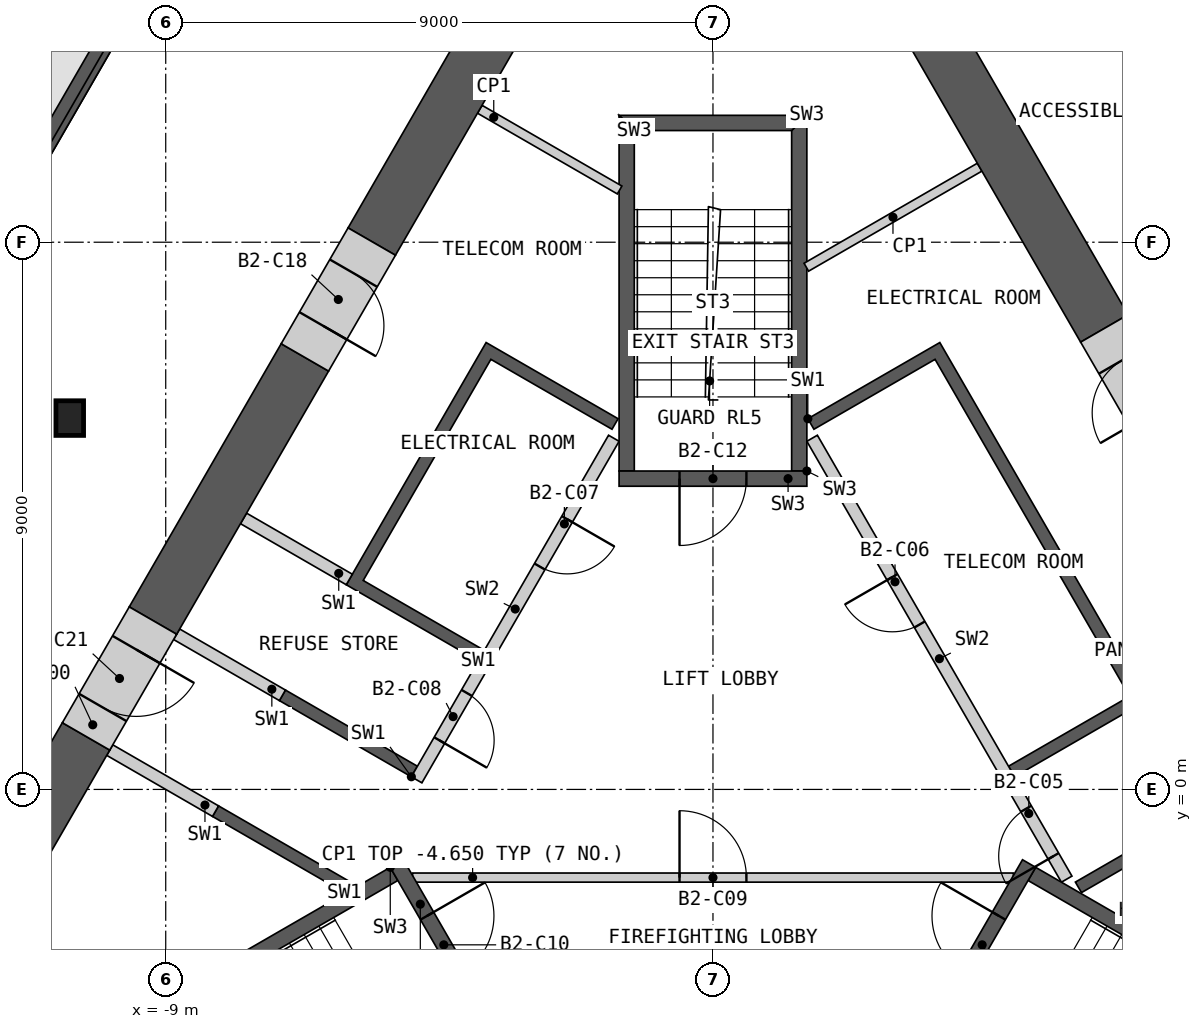
"""IFC4 building model, lengths in metres.
Left out: names, types, materials, properties, quantities, classifications, styles, units other than length and angle.
Written with IfcOpenShell. Run it as: python <this file> out.ifc"""

import sys

from ifc_helpers import new_model, si_unit, direction, frame, frame_2d, origin, origin_2d, place, context, subcontext, project, spatial, polyline, rectangle, i_section, outline, extrude, element, fill, save


model = new_model("IFC4")
c1 = context("Model", 3, precision=1e-05, world=origin(), true_north=direction((0.0, 1.0)))
c2 = subcontext(c1, "Body", "Model", "MODEL_VIEW")
j1 = project(units=[si_unit("LENGTHUNIT", "METRE"), si_unit("PLANEANGLEUNIT", "RADIAN")], contexts=[c1])
p1 = place(None, origin())
s1 = spatial("IfcSite", under=j1, at=p1, CompositionType="ELEMENT")
p2 = place(p1, origin())
s2 = spatial("IfcBuilding", under=s1, at=p2, CompositionType="ELEMENT")
p3 = place(p2, frame((0.0, 0.0, -8.4)))
s3 = spatial("IfcBuildingStorey", under=s2, at=p3, CompositionType="ELEMENT", Elevation=-8.4)
for number, where, z_axis, x_axis in (
    (1, (31.74, -10.542, 0.0), (0.0, 0.0, 1.0), (-0.5, 0.866, 0.0)),
    (2, (-6.74, 32.759, 0.0), (0.0, 0.0, 1.0), (-0.5, -0.866, 0.0)),
):
    element("IfcWall", number, at=place(p3, frame(where, z_axis=z_axis, x_axis=x_axis)), inside=s3, PredefinedType="SOLIDWALL", context=c2, shape_type="SweptSolid", body=[
        extrude(rectangle(XDim=50.0, YDim=0.6, at=frame_2d((25.0, 0.0))), origin(), (0.0, 0.0, 1.0), 3.75),
    ])
p4 = place(p3, frame((-10.578, 6.107, 0.0), z_axis=(0.0, 0.0, 1.0), x_axis=(1.0, 0.0, 0.0)))
e3 = element("IfcColumn", 3, at=p4, inside=s3, PredefinedType="COLUMN", context=c2, shape_type="SweptSolid", body=[
    extrude(i_section(OverallWidth=0.454, OverallDepth=0.57, WebThickness=0.078, FlangeThickness=0.125, at=origin_2d()), origin(), (0.0, 0.0, 1.0), 4.2),
])
p5 = place(p3, origin())
e4 = element("IfcWall", 4, at=p5, inside=s3, PredefinedType="SHEAR", context=c2, shape_type="SweptSolid", body=[
    extrude(outline(polyline([(1.561, 6.097), (3.731, 7.35), (7.131, 1.461), (4.96, 0.208), (4.861, 0.381), (6.852, 1.531), (3.652, 7.074), (1.66, 5.924), (1.561, 6.097)])), origin(), (0.0, 0.0, 1.0), 3.75),
])
p6 = place(p3, origin())
e5 = element("IfcWall", 5, at=p6, inside=s3, PredefinedType="SHEAR", context=c2, shape_type="SweptSolid", body=[
    extrude(outline(polyline([(8.231, -0.444), (6.061, -1.697), (5.96, -1.524), (8.131, -0.271), (8.231, -0.444)])), origin(), (0.0, 0.0, 1.0), 3.75),
])
p7 = place(p3, frame((5.817, -1.476, 0.0), z_axis=(0.0, 0.0, 1.0), x_axis=(-0.500002616675, 0.866023893041, 0.0)))
e6 = element("IfcWall", 6, at=p7, inside=s3, PredefinedType="SOLIDWALL", context=c2, shape_type="SweptSolid", body=[
    extrude(rectangle(XDim=8.373, YDim=0.2, at=frame_2d((4.187, 0.0))), origin(), (0.0, 0.0, 1.0), 3.75),
])
p8 = place(p7, frame((0.437, 0.0, 0.0)))
e7 = element("IfcOpeningElement", 7, at=p8, cuts=e6, PredefinedType="OPENING", context=c2, shape_type="SweptSolid", body=[
    extrude(rectangle(XDim=0.9, YDim=2.1, at=frame_2d((0.45, 1.05))), frame((0.0, 0.11, 0.0), z_axis=(0.0, -1.0, 0.0), x_axis=(1.0, 0.0, 0.0)), (0.0, 0.0, 1.0), 0.22),
])
p9 = place(p7, frame((4.837, 0.0, 0.0)))
e8 = element("IfcOpeningElement", 8, at=p9, cuts=e6, PredefinedType="OPENING", context=c2, shape_type="SweptSolid", body=[
    extrude(rectangle(XDim=0.9, YDim=2.1, at=frame_2d((0.45, 1.05))), frame((0.0, 0.11, 0.0), z_axis=(0.0, -1.0, 0.0), x_axis=(1.0, 0.0, 0.0)), (0.0, 0.0, 1.0), 0.22),
])
p10 = place(p3, origin())
e9 = element("IfcWall", 9, at=p10, inside=s3, PredefinedType="SHEAR", context=c2, shape_type="SweptSolid", body=[
    extrude(outline(polyline([(-6.061, -1.697), (-8.231, -0.444), (-8.131, -0.271), (-5.96, -1.524), (-6.061, -1.697)])), origin(), (0.0, 0.0, 1.0), 3.75),
])
p11 = place(p3, origin())
e10 = element("IfcWall", 10, at=p11, inside=s3, PredefinedType="SHEAR", context=c2, shape_type="SweptSolid", body=[
    extrude(outline(polyline([(-4.96, 0.208), (-7.131, 1.461), (-7.031, 1.634), (-4.861, 0.381), (-4.96, 0.208)])), origin(), (0.0, 0.0, 1.0), 3.75),
])
p12 = place(p3, origin())
e11 = element("IfcWall", 11, at=p12, inside=s3, PredefinedType="SHEAR", context=c2, shape_type="SweptSolid", body=[
    extrude(outline(polyline([(-3.861, 2.113), (-6.031, 3.366), (-3.731, 7.35), (-1.561, 6.097), (-1.66, 5.924), (-3.652, 7.074), (-5.752, 3.437), (-3.76, 2.287), (-3.861, 2.113)])), origin(), (0.0, 0.0, 1.0), 3.75),
])
p13 = place(p3, frame((-1.631, 5.776, 0.0), z_axis=(0.0, 0.0, 1.0), x_axis=(-0.499992876559, -0.866029516466, 0.0)))
e12 = element("IfcWall", 12, at=p13, inside=s3, PredefinedType="SOLIDWALL", context=c2, shape_type="SweptSolid", body=[
    extrude(rectangle(XDim=6.486, YDim=0.2, at=frame_2d((3.243, 0.0))), origin(), (0.0, 0.0, 1.0), 3.75),
])
p14 = place(p13, frame((1.537, 0.0, 0.0)))
e13 = element("IfcOpeningElement", 13, at=p14, cuts=e12, PredefinedType="OPENING", context=c2, shape_type="SweptSolid", body=[
    extrude(rectangle(XDim=0.9, YDim=2.1, at=frame_2d((0.45, 1.05))), frame((0.0, 0.11, 0.0), z_axis=(0.0, -1.0, 0.0), x_axis=(1.0, 0.0, 0.0)), (0.0, 0.0, 1.0), 0.22),
])
p15 = place(p13, frame((4.837, 0.0, 0.0)))
e14 = element("IfcOpeningElement", 14, at=p15, cuts=e12, PredefinedType="OPENING", context=c2, shape_type="SweptSolid", body=[
    extrude(rectangle(XDim=0.9, YDim=2.1, at=frame_2d((0.45, 1.05))), frame((0.0, 0.11, 0.0), z_axis=(0.0, -1.0, 0.0), x_axis=(1.0, 0.0, 0.0)), (0.0, 0.0, 1.0), 0.22),
])
p16 = place(p3, frame((-5.981, 3.453, 0.0), z_axis=(0.0, 0.0, 1.0), x_axis=(-0.866013584312, 0.500020471368, 0.0)))
e15 = element("IfcWall", 15, at=p16, inside=s3, PredefinedType="SHEAR", context=c2, shape_type="SweptSolid", body=[
    extrude(rectangle(XDim=2.009, YDim=0.2, at=frame_2d((1.005, 0.0))), origin(), (0.0, 0.0, 1.0), 3.75),
])
p17 = place(p3, frame((-7.081, 1.548, 0.0), z_axis=(0.0, 0.0, 1.0), x_axis=(-0.865983199114, 0.50007309351, 0.0)))
e16 = element("IfcWall", 16, at=p17, inside=s3, PredefinedType="SHEAR", context=c2, shape_type="SweptSolid", body=[
    extrude(rectangle(XDim=2.009, YDim=0.2, at=frame_2d((1.004, 0.0))), origin(), (0.0, 0.0, 1.0), 3.75),
])
p18 = place(p3, frame((-8.181, -0.357, 0.0), z_axis=(0.0, 0.0, 1.0), x_axis=(-0.866035824272, 0.499981950752, 0.0)))
e17 = element("IfcWall", 17, at=p18, inside=s3, PredefinedType="SHEAR", context=c2, shape_type="SweptSolid", body=[
    extrude(rectangle(XDim=2.009, YDim=0.2, at=frame_2d((1.004, 0.0))), origin(), (0.0, 0.0, 1.0), 3.75),
])
p19 = place(p3, frame((-4.941, -1.45, 0.0), z_axis=(0.0, 0.0, 1.0), x_axis=(1.0, 0.0, 0.0)))
e18 = element("IfcWall", 18, at=p19, inside=s3, PredefinedType="PARTITIONING", context=c2, shape_type="SweptSolid", body=[
    extrude(rectangle(XDim=9.882, YDim=0.15, at=frame_2d((4.941, 0.0))), origin(), (0.0, 0.0, 1.0), 3.75),
])
p20 = place(p19, frame((4.391, 0.0, 0.0)))
e19 = element("IfcOpeningElement", 19, at=p20, cuts=e18, PredefinedType="OPENING", context=c2, shape_type="SweptSolid", body=[
    extrude(rectangle(XDim=1.1, YDim=2.1, at=frame_2d((0.55, 1.05))), frame((0.0, 0.085, 0.0), z_axis=(0.0, -1.0, 0.0), x_axis=(1.0, 0.0, 0.0)), (0.0, 0.0, 1.0), 0.17),
])
p21 = place(p3, origin())
e20 = element("IfcWall", 20, at=p21, inside=s3, PredefinedType="SHEAR", context=c2, shape_type="SweptSolid", body=[
    extrude(outline(polyline([(-5.307, -1.281), (-10.374, -4.206), (-10.032, -4.298), (-5.182, -1.498), (-5.307, -1.281)])), origin(), (0.0, 0.0, 1.0), 3.75),
])
p22 = place(p3, frame((-5.199, -1.219, 0.0), z_axis=(0.0, 0.0, 1.0), x_axis=(0.499982516597, -0.866035497597, 0.0)))
e21 = element("IfcWall", 21, at=p22, inside=s3, PredefinedType="SHEAR", context=c2, shape_type="SweptSolid", body=[
    extrude(rectangle(XDim=3.088, YDim=0.25, at=frame_2d((1.544, 0.0))), origin(), (0.0, 0.0, 1.0), 3.75),
])
p23 = place(p22, frame((0.994, 0.0, 0.0)))
e22 = element("IfcOpeningElement", 22, at=p23, cuts=e21, PredefinedType="OPENING", context=c2, shape_type="SweptSolid", body=[
    extrude(rectangle(XDim=1.1, YDim=2.1, at=frame_2d((0.55, 1.05))), frame((0.0, 0.135, 0.0), z_axis=(0.0, -1.0, 0.0), x_axis=(1.0, 0.0, 0.0)), (0.0, 0.0, 1.0), 0.27),
])
p24 = place(p3, origin())
e23 = element("IfcWall", 23, at=p24, inside=s3, PredefinedType="SHEAR", context=c2, shape_type="SweptSolid", body=[
    extrude(outline(polyline([(10.032, -4.298), (10.374, -4.206), (5.307, -1.281), (5.182, -1.498), (10.032, -4.298)])), origin(), (0.0, 0.0, 1.0), 3.75),
])
p25 = place(p3, frame((3.655, -3.893, 0.0), z_axis=(0.0, 0.0, 1.0), x_axis=(0.499982516597, 0.866035497597, 0.0)))
e24 = element("IfcWall", 24, at=p25, inside=s3, PredefinedType="SHEAR", context=c2, shape_type="SweptSolid", body=[
    extrude(rectangle(XDim=3.088, YDim=0.25, at=frame_2d((1.544, 0.0))), origin(), (0.0, 0.0, 1.0), 3.75),
])
p26 = place(p25, frame((0.994, 0.0, 0.0)))
e25 = element("IfcOpeningElement", 25, at=p26, cuts=e24, PredefinedType="OPENING", context=c2, shape_type="SweptSolid", body=[
    extrude(rectangle(XDim=1.1, YDim=2.1, at=frame_2d((0.55, 1.05))), frame((0.0, 0.135, 0.0), z_axis=(0.0, -1.0, 0.0), x_axis=(1.0, 0.0, 0.0)), (0.0, 0.0, 1.0), 0.27),
])
p27 = place(p3, origin())
e26 = element("IfcWall", 26, at=p27, inside=s3, PredefinedType="SHEAR", context=c2, shape_type="SweptSolid", body=[
    extrude(outline(polyline([(1.544, 5.237), (1.544, 11.087), (1.294, 10.837), (1.294, 5.237), (1.544, 5.237)])), origin(), (0.0, 0.0, 1.0), 3.75),
])
p28 = place(p3, origin())
e27 = element("IfcWall", 27, at=p28, inside=s3, PredefinedType="SHEAR", context=c2, shape_type="SweptSolid", body=[
    extrude(outline(polyline([(1.544, 11.087), (-1.544, 11.087), (-1.294, 10.837), (1.294, 10.837), (1.544, 11.087)])), origin(), (0.0, 0.0, 1.0), 3.75),
])
p29 = place(p3, origin())
e28 = element("IfcWall", 28, at=p29, inside=s3, PredefinedType="SHEAR", context=c2, shape_type="SweptSolid", body=[
    extrude(outline(polyline([(-1.294, 10.837), (-1.544, 11.087), (-1.544, 5.237), (-1.294, 5.237), (-1.294, 10.837)])), origin(), (0.0, 0.0, 1.0), 3.75),
])
p30 = place(p3, frame((1.544, 5.112, 0.0), z_axis=(0.0, 0.0, 1.0), x_axis=(-1.0, 0.0, 0.0)))
e29 = element("IfcWall", 29, at=p30, inside=s3, PredefinedType="SHEAR", context=c2, shape_type="SweptSolid", body=[
    extrude(rectangle(XDim=3.088, YDim=0.25, at=frame_2d((1.544, 0.0))), origin(), (0.0, 0.0, 1.0), 3.75),
])
p31 = place(p30, frame((0.994, 0.0, 0.0)))
e30 = element("IfcOpeningElement", 30, at=p31, cuts=e29, PredefinedType="OPENING", context=c2, shape_type="SweptSolid", body=[
    extrude(rectangle(XDim=1.1, YDim=2.1, at=frame_2d((0.55, 1.05))), frame((0.0, 0.135, 0.0), z_axis=(0.0, -1.0, 0.0), x_axis=(1.0, 0.0, 0.0)), (0.0, 0.0, 1.0), 0.27),
])
p32 = place(p3, frame((4.385, 10.234, 0.0), z_axis=(0.0, 0.0, 1.0), x_axis=(-0.866006439694, -0.50003284533, 0.0)))
e31 = element("IfcWall", 31, at=p32, inside=s3, PredefinedType="PARTITIONING", context=c2, shape_type="SweptSolid", body=[
    extrude(rectangle(XDim=3.291, YDim=0.15, at=frame_2d((1.646, 0.0))), origin(), (0.0, 0.0, 1.0), 3.75),
])
p33 = place(p3, frame((-3.835, 11.187, 0.0), z_axis=(0.0, 0.0, 1.0), x_axis=(0.866011053975, -0.500024853776, 0.0)))
e32 = element("IfcWall", 32, at=p33, inside=s3, PredefinedType="PARTITIONING", context=c2, shape_type="SweptSolid", body=[
    extrude(rectangle(XDim=2.656, YDim=0.15, at=frame_2d((1.328, 0.0))), origin(), (0.0, 0.0, 1.0), 3.75),
])
p34 = place(p3, frame((6.436, 7.582, 0.0), z_axis=(0.0, 0.0, 1.0), x_axis=(-0.500003364394, 0.866023461342, 0.0)))
e33 = element("IfcWall", 33, at=p34, inside=s3, PredefinedType="SHEAR", context=c2, shape_type="SweptSolid", body=[
    extrude(rectangle(XDim=6.646, YDim=0.9, at=frame_2d((3.323, 0.0))), origin(), (0.0, 0.0, 1.0), 3.75),
])
p35 = place(p3, frame((-0.39, 18.055, 0.0), z_axis=(0.0, 0.0, 1.0), x_axis=(-0.500001039332, -0.866024803725, 0.0)))
e34 = element("IfcWall", 34, at=p35, inside=s3, PredefinedType="SHEAR", context=c2, shape_type="SweptSolid", body=[
    extrude(rectangle(XDim=10.443, YDim=0.9, at=frame_2d((5.222, 0.0))), origin(), (0.0, 0.0, 1.0), 3.75),
])
p36 = place(p3, frame((-6.711, 7.105, 0.0), z_axis=(0.0, 0.0, 1.0), x_axis=(-0.499969117767, -0.866043232916, 0.0)))
e35 = element("IfcWall", 35, at=p36, inside=s3, PredefinedType="SHEAR", context=c2, shape_type="SweptSolid", body=[
    extrude(rectangle(XDim=4.998, YDim=0.9, at=frame_2d((2.499, 0.0))), origin(), (0.0, 0.0, 1.0), 3.75),
])
p37 = place(p3, frame((-10.31, 0.872, 0.0), z_axis=(0.0, 0.0, 1.0), x_axis=(-0.499991893987, -0.866030083742, 0.0)))
e36 = element("IfcWall", 36, at=p37, inside=s3, PredefinedType="SHEAR", context=c2, shape_type="SweptSolid", body=[
    extrude(rectangle(XDim=4.471, YDim=0.9, at=frame_2d((2.235, 0.0))), origin(), (0.0, 0.0, 1.0), 3.75),
])
p38 = place(p3, frame((7.536, 5.677, 0.0), z_axis=(0.0, 0.0, 1.0), x_axis=(-0.50002983664, 0.866008176907, 0.0)))
e37 = element("IfcWall", 37, at=p38, inside=s3, PredefinedType="SHEAR", context=c2, shape_type="SweptSolid", body=[
    extrude(rectangle(XDim=2.2, YDim=0.9, at=frame_2d((1.1, 0.0))), origin(), (0.0, 0.0, 1.0), 3.75),
])
p39 = place(p38, frame((0.6, 0.0, 0.0)))
e38 = element("IfcOpeningElement", 38, at=p39, cuts=e37, PredefinedType="OPENING", context=c2, shape_type="SweptSolid", body=[
    extrude(rectangle(XDim=1.0, YDim=2.1, at=frame_2d((0.5, 1.05))), frame((0.0, 0.46, 0.0), z_axis=(0.0, -1.0, 0.0), x_axis=(1.0, 0.0, 0.0)), (0.0, 0.0, 1.0), 0.92),
])
p40 = place(p3, frame((-5.611, 9.011, 0.0), z_axis=(0.0, 0.0, 1.0), x_axis=(-0.50002983664, -0.866008176907, 0.0)))
e39 = element("IfcWall", 39, at=p40, inside=s3, PredefinedType="SHEAR", context=c2, shape_type="SweptSolid", body=[
    extrude(rectangle(XDim=2.2, YDim=0.9, at=frame_2d((1.1, 0.0))), origin(), (0.0, 0.0, 1.0), 3.75),
])
p41 = place(p40, frame((0.6, 0.0, 0.0)))
e40 = element("IfcOpeningElement", 40, at=p41, cuts=e39, PredefinedType="OPENING", context=c2, shape_type="SweptSolid", body=[
    extrude(rectangle(XDim=1.0, YDim=2.1, at=frame_2d((0.5, 1.05))), frame((0.0, 0.46, 0.0), z_axis=(0.0, -1.0, 0.0), x_axis=(1.0, 0.0, 0.0)), (0.0, 0.0, 1.0), 0.92),
])
p42 = place(p3, frame((-9.21, 2.777, 0.0), z_axis=(0.0, 0.0, 1.0), x_axis=(-0.500077893725, -0.86598042715, 0.0)))
e41 = element("IfcWall", 41, at=p42, inside=s3, PredefinedType="SHEAR", context=c2, shape_type="SweptSolid", body=[
    extrude(rectangle(XDim=2.2, YDim=0.9, at=frame_2d((1.1, 0.0))), origin(), (0.0, 0.0, 1.0), 3.75),
])
p43 = place(p42, frame((0.55, 0.0, 0.0)))
e42 = element("IfcOpeningElement", 42, at=p43, cuts=e41, PredefinedType="OPENING", context=c2, shape_type="SweptSolid", body=[
    extrude(rectangle(XDim=1.1, YDim=2.1, at=frame_2d((0.55, 1.05))), frame((0.0, 0.46, 0.0), z_axis=(0.0, -1.0, 0.0), x_axis=(1.0, 0.0, 0.0)), (0.0, 0.0, 1.0), 0.92),
])
p44 = place(p3, frame((-2.817, 24.72, 0.0), z_axis=(0.0, 0.0, 1.0), x_axis=(-0.500000572924, -0.866025073006, 0.0)))
e43 = element("IfcWall", 43, at=p44, inside=s3, PredefinedType="SHEAR", context=c2, shape_type="SweptSolid", body=[
    extrude(outline(polyline([(0.0, 0.0), (22.467, 0.0), (22.467, 0.3), (3.0, 3.549), (3.0, 3.544), (0.0, 3.799), (0.0, 0.0)])), frame((0.0, 0.15, 0.0), z_axis=(0.0, -1.0, 0.0), x_axis=(1.0, 0.0, 0.0)), (0.0, 0.0, 1.0), 0.3),
])
p45 = place(p3, frame((-7.753, 27.571, 0.0), z_axis=(0.0, 0.0, 1.0), x_axis=(-0.500004017478, -0.86602308428, 0.0)))
e44 = element("IfcWall", 44, at=p45, inside=s3, PredefinedType="SHEAR", context=c2, shape_type="SweptSolid", body=[
    extrude(outline(polyline([(0.0, 0.0), (22.467, 0.0), (22.467, 0.3), (3.0, 3.549), (3.0, 3.544), (0.0, 3.799), (0.0, 0.0)])), frame((0.0, 0.15, 0.0), z_axis=(0.0, -1.0, 0.0), x_axis=(1.0, 0.0, 0.0)), (0.0, 0.0, 1.0), 0.3),
])
p46 = place(p8, origin())
e45 = element("IfcDoor", 45, at=p46, inside=s3, OperationType="SINGLE_SWING_LEFT", PredefinedType="DOOR", context=c2, shape_type="SweptSolid", body=[
    extrude(rectangle(XDim=0.9, YDim=2.1, at=frame_2d((0.45, 1.05))), frame((0.0, 0.025, 0.0), z_axis=(0.0, -1.0, 0.0), x_axis=(1.0, 0.0, 0.0)), (0.0, 0.0, 1.0), 0.05),
])
fill(e7, e45)
p47 = place(p9, origin())
e46 = element("IfcDoor", 46, at=p47, inside=s3, OperationType="SINGLE_SWING_RIGHT", PredefinedType="DOOR", context=c2, shape_type="SweptSolid", body=[
    extrude(rectangle(XDim=0.9, YDim=2.1, at=frame_2d((0.45, 1.05))), frame((0.0, 0.025, 0.0), z_axis=(0.0, -1.0, 0.0), x_axis=(1.0, 0.0, 0.0)), (0.0, 0.0, 1.0), 0.05),
])
fill(e8, e46)
p48 = place(p14, origin())
e47 = element("IfcDoor", 47, at=p48, inside=s3, OperationType="SINGLE_SWING_LEFT", PredefinedType="DOOR", context=c2, shape_type="SweptSolid", body=[
    extrude(rectangle(XDim=0.9, YDim=2.1, at=frame_2d((0.45, 1.05))), frame((0.0, 0.025, 0.0), z_axis=(0.0, -1.0, 0.0), x_axis=(1.0, 0.0, 0.0)), (0.0, 0.0, 1.0), 0.05),
])
fill(e13, e47)
p49 = place(p15, origin())
e48 = element("IfcDoor", 48, at=p49, inside=s3, OperationType="SINGLE_SWING_RIGHT", PredefinedType="DOOR", context=c2, shape_type="SweptSolid", body=[
    extrude(rectangle(XDim=0.9, YDim=2.1, at=frame_2d((0.45, 1.05))), frame((0.0, 0.025, 0.0), z_axis=(0.0, -1.0, 0.0), x_axis=(1.0, 0.0, 0.0)), (0.0, 0.0, 1.0), 0.05),
])
fill(e14, e48)
p50 = place(p20, origin())
e49 = element("IfcDoor", 49, at=p50, inside=s3, OperationType="SINGLE_SWING_LEFT", PredefinedType="DOOR", context=c2, shape_type="SweptSolid", body=[
    extrude(rectangle(XDim=1.1, YDim=2.1, at=frame_2d((0.55, 1.05))), frame((0.0, 0.025, 0.0), z_axis=(0.0, -1.0, 0.0), x_axis=(1.0, 0.0, 0.0)), (0.0, 0.0, 1.0), 0.05),
])
fill(e19, e49)
p51 = place(p23, origin())
e50 = element("IfcDoor", 50, at=p51, inside=s3, OperationType="SINGLE_SWING_LEFT", PredefinedType="DOOR", context=c2, shape_type="SweptSolid", body=[
    extrude(rectangle(XDim=1.1, YDim=2.1, at=frame_2d((0.55, 1.05))), frame((0.0, 0.025, 0.0), z_axis=(0.0, -1.0, 0.0), x_axis=(1.0, 0.0, 0.0)), (0.0, 0.0, 1.0), 0.05),
])
fill(e22, e50)
p52 = place(p26, origin())
e51 = element("IfcDoor", 51, at=p52, inside=s3, OperationType="SINGLE_SWING_RIGHT", PredefinedType="DOOR", context=c2, shape_type="SweptSolid", body=[
    extrude(rectangle(XDim=1.1, YDim=2.1, at=frame_2d((0.55, 1.05))), frame((0.0, 0.025, 0.0), z_axis=(0.0, -1.0, 0.0), x_axis=(1.0, 0.0, 0.0)), (0.0, 0.0, 1.0), 0.05),
])
fill(e25, e51)
p53 = place(p31, origin())
e52 = element("IfcDoor", 52, at=p53, inside=s3, OperationType="SINGLE_SWING_RIGHT", PredefinedType="DOOR", context=c2, shape_type="SweptSolid", body=[
    extrude(rectangle(XDim=1.1, YDim=2.1, at=frame_2d((0.55, 1.05))), frame((0.0, 0.025, 0.0), z_axis=(0.0, -1.0, 0.0), x_axis=(1.0, 0.0, 0.0)), (0.0, 0.0, 1.0), 0.05),
])
fill(e30, e52)
p54 = place(p39, origin())
e53 = element("IfcDoor", 53, at=p54, inside=s3, OperationType="SINGLE_SWING_LEFT", PredefinedType="DOOR", context=c2, shape_type="SweptSolid", body=[
    extrude(rectangle(XDim=1.0, YDim=2.1, at=frame_2d((0.5, 1.05))), frame((0.0, 0.205, 0.0), z_axis=(0.0, -1.0, 0.0), x_axis=(1.0, 0.0, 0.0)), (0.0, 0.0, 1.0), 0.05),
])
fill(e38, e53)
p55 = place(p41, origin())
e54 = element("IfcDoor", 54, at=p55, inside=s3, OperationType="SINGLE_SWING_RIGHT", PredefinedType="DOOR", context=c2, shape_type="SweptSolid", body=[
    extrude(rectangle(XDim=1.0, YDim=2.1, at=frame_2d((0.5, 1.05))), frame((0.0, 0.205, 0.0), z_axis=(0.0, -1.0, 0.0), x_axis=(1.0, 0.0, 0.0)), (0.0, 0.0, 1.0), 0.05),
])
fill(e40, e54)
p56 = place(p43, origin())
e55 = element("IfcDoor", 55, at=p56, inside=s3, OperationType="SINGLE_SWING_LEFT", PredefinedType="DOOR", context=c2, shape_type="SweptSolid", body=[
    extrude(rectangle(XDim=1.1, YDim=2.1, at=frame_2d((0.55, 1.05))), frame((0.0, 0.205, 0.0), z_axis=(0.0, -1.0, 0.0), x_axis=(1.0, 0.0, 0.0)), (0.0, 0.0, 1.0), 0.05),
])
fill(e42, e55)
save(model, sys.argv[1])
